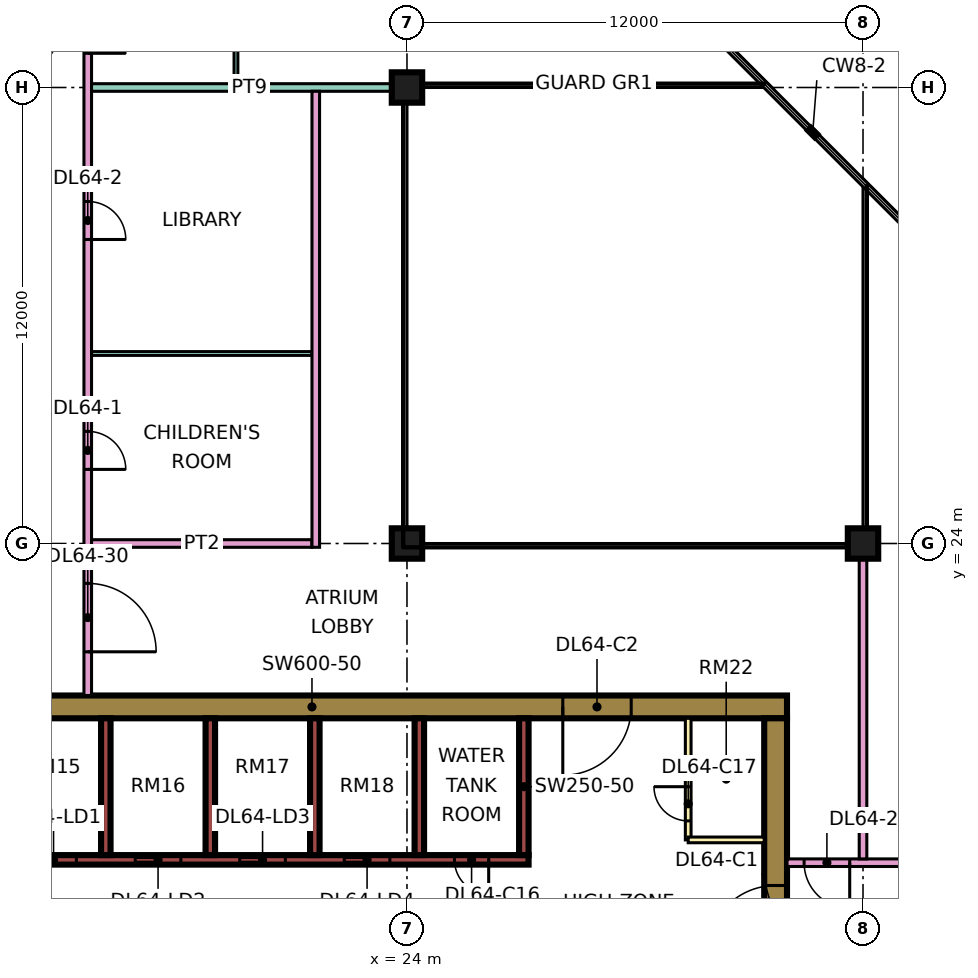
"""IFC4 building model, lengths in metres.
Left out: names, types, materials, properties, quantities, classifications, styles, units other than length and angle.
Written with IfcOpenShell. Run it as: python <this file> out.ifc"""

import sys

from ifc_helpers import new_model, si_unit, direction, frame, frame_2d, origin, origin_2d, place, context, subcontext, project, spatial, rectangle, extrude, element, fill, save


model = new_model("IFC4")
c1 = context("Model", 3, precision=1e-05, world=origin(), true_north=direction((0.0, 1.0)))
c2 = subcontext(c1, "Body", "Model", "MODEL_VIEW")
j1 = project(units=[si_unit("LENGTHUNIT", "METRE"), si_unit("PLANEANGLEUNIT", "RADIAN")], contexts=[c1])
p1 = place(None, origin())
s1 = spatial("IfcSite", under=j1, at=p1, CompositionType="ELEMENT")
p2 = place(p1, origin())
s2 = spatial("IfcBuilding", under=s1, at=p2, CompositionType="ELEMENT")
p3 = place(p2, frame((0.0, 0.0, 277.15)))
s3 = spatial("IfcBuildingStorey", under=s2, at=p3, CompositionType="ELEMENT", Elevation=277.15)
for number, where, z_axis, x_axis in (
    (1, (24.0, 24.0, 0.0), (0.0, 0.0, 1.0), (1.0, 0.0, 0.0)),
    (2, (24.0, 36.0, 0.0), (0.0, 0.0, 1.0), (1.0, 0.0, 0.0)),
    (3, (36.0, 24.0, 0.0), (0.0, 0.0, 1.0), (1.0, 0.0, 0.0)),
):
    element("IfcColumn", number, at=place(p3, frame(where, z_axis=z_axis, x_axis=x_axis)), inside=s3, PredefinedType="COLUMN", context=c2, shape_type="SweptSolid", body=[
        extrude(rectangle(XDim=0.8, YDim=0.8, at=origin_2d()), origin(), (0.0, 0.0, 1.0), 3.75),
    ])
p4 = place(p3, frame((9.0, 19.7, 0.0), z_axis=(0.0, 0.0, 1.0), x_axis=(1.0, 0.0, 0.0)))
e4 = element("IfcWall", 4, at=p4, inside=s3, PredefinedType="SHEAR", context=c2, shape_type="SweptSolid", body=[
    extrude(rectangle(XDim=25.0, YDim=0.6, at=frame_2d((12.5, 0.0))), origin(), (0.0, 0.0, 1.0), 3.75),
])
p5 = place(p4, frame((19.1, 0.0, 0.0)))
e5 = element("IfcOpeningElement", 5, at=p5, cuts=e4, PredefinedType="OPENING", context=c2, shape_type="SweptSolid", body=[
    extrude(rectangle(XDim=1.8, YDim=2.4, at=frame_2d((0.9, 1.2))), frame((0.0, 0.31, 0.0), z_axis=(0.0, -1.0, 0.0), x_axis=(1.0, 0.0, 0.0)), (0.0, 0.0, 1.0), 0.62),
])
p6 = place(p3, frame((33.7, 7.6, 0.0), z_axis=(0.0, 0.0, 1.0), x_axis=(0.0, 1.0, 0.0)))
e6 = element("IfcWall", 6, at=p6, inside=s3, PredefinedType="SHEAR", context=c2, shape_type="SweptSolid", body=[
    extrude(rectangle(XDim=11.8, YDim=0.6, at=frame_2d((5.9, 0.0))), origin(), (0.0, 0.0, 1.0), 3.75),
])
p7 = place(p6, frame((5.6, 0.0, 0.0)))
e7 = element("IfcOpeningElement", 7, at=p7, cuts=e6, PredefinedType="OPENING", context=c2, shape_type="SweptSolid", body=[
    extrude(rectangle(XDim=1.8, YDim=2.4, at=frame_2d((0.9, 1.2))), frame((0.0, 0.31, 0.0), z_axis=(0.0, -1.0, 0.0), x_axis=(1.0, 0.0, 0.0)), (0.0, 0.0, 1.0), 0.62),
])
p8 = place(p3, frame((13.45, 15.675, 0.0), z_axis=(0.0, 0.0, 1.0), x_axis=(1.0, 0.0, 0.0)))
e8 = element("IfcWall", 8, at=p8, inside=s3, PredefinedType="SHEAR", context=c2, shape_type="SweptSolid", body=[
    extrude(rectangle(XDim=13.75, YDim=0.25, at=frame_2d((6.875, 0.0))), origin(), (0.0, 0.0, 1.0), 3.75),
])
p9 = place(p8, frame((0.65, 0.0, 0.0)))
e9 = element("IfcOpeningElement", 9, at=p9, cuts=e8, PredefinedType="OPENING", context=c2, shape_type="SweptSolid", body=[
    extrude(rectangle(XDim=1.2, YDim=2.2, at=frame_2d((0.6, 1.1))), frame((0.0, 0.135, 0.0), z_axis=(0.0, -1.0, 0.0), x_axis=(1.0, 0.0, 0.0)), (0.0, 0.0, 1.0), 0.27),
])
p10 = place(p8, frame((3.4, 0.0, 0.0)))
e10 = element("IfcOpeningElement", 10, at=p10, cuts=e8, PredefinedType="OPENING", context=c2, shape_type="SweptSolid", body=[
    extrude(rectangle(XDim=1.2, YDim=2.2, at=frame_2d((0.6, 1.1))), frame((0.0, 0.135, 0.0), z_axis=(0.0, -1.0, 0.0), x_axis=(1.0, 0.0, 0.0)), (0.0, 0.0, 1.0), 0.27),
])
p11 = place(p8, frame((6.15, 0.0, 0.0)))
e11 = element("IfcOpeningElement", 11, at=p11, cuts=e8, PredefinedType="OPENING", context=c2, shape_type="SweptSolid", body=[
    extrude(rectangle(XDim=1.2, YDim=2.2, at=frame_2d((0.6, 1.1))), frame((0.0, 0.135, 0.0), z_axis=(0.0, -1.0, 0.0), x_axis=(1.0, 0.0, 0.0)), (0.0, 0.0, 1.0), 0.27),
])
p12 = place(p8, frame((8.9, 0.0, 0.0)))
e12 = element("IfcOpeningElement", 12, at=p12, cuts=e8, PredefinedType="OPENING", context=c2, shape_type="SweptSolid", body=[
    extrude(rectangle(XDim=1.2, YDim=2.2, at=frame_2d((0.6, 1.1))), frame((0.0, 0.135, 0.0), z_axis=(0.0, -1.0, 0.0), x_axis=(1.0, 0.0, 0.0)), (0.0, 0.0, 1.0), 0.27),
])
p13 = place(p8, frame((11.8, 0.0, 0.0)))
e13 = element("IfcOpeningElement", 13, at=p13, cuts=e8, PredefinedType="OPENING", context=c2, shape_type="SweptSolid", body=[
    extrude(rectangle(XDim=0.9, YDim=2.1, at=frame_2d((0.45, 1.05))), frame((0.0, 0.135, 0.0), z_axis=(0.0, -1.0, 0.0), x_axis=(1.0, 0.0, 0.0)), (0.0, 0.0, 1.0), 0.27),
])
for number, where, z_axis, x_axis in (
    (14, (16.075, 15.8, 0.0), (0.0, 0.0, 1.0), (0.0, 1.0, 0.0)),
    (15, (18.825, 15.8, 0.0), (0.0, 0.0, 1.0), (0.0, 1.0, 0.0)),
    (16, (21.575, 15.8, 0.0), (0.0, 0.0, 1.0), (0.0, 1.0, 0.0)),
    (17, (24.325, 15.8, 0.0), (0.0, 0.0, 1.0), (0.0, 1.0, 0.0)),
    (18, (27.075, 15.8, 0.0), (0.0, 0.0, 1.0), (0.0, 1.0, 0.0)),
):
    element("IfcWall", number, at=place(p3, frame(where, z_axis=z_axis, x_axis=x_axis)), inside=s3, PredefinedType="SHEAR", context=c2, shape_type="SweptSolid", body=[
        extrude(rectangle(XDim=3.6, YDim=0.25, at=frame_2d((1.8, 0.0))), origin(), (0.0, 0.0, 1.0), 3.75),
    ])
p14 = place(p3, frame((31.4, 16.2, 0.0), z_axis=(0.0, 0.0, 1.0), x_axis=(0.0, 1.0, 0.0)))
e19 = element("IfcWall", 19, at=p14, inside=s3, PredefinedType="PARTITIONING", context=c2, shape_type="SweptSolid", body=[
    extrude(rectangle(XDim=3.2, YDim=0.15, at=frame_2d((1.6, 0.0))), origin(), (0.0, 0.0, 1.0), 3.35),
])
p15 = place(p14, frame((0.5, 0.0, 0.0)))
e20 = element("IfcOpeningElement", 20, at=p15, cuts=e19, PredefinedType="OPENING", context=c2, shape_type="SweptSolid", body=[
    extrude(rectangle(XDim=0.9, YDim=2.1, at=frame_2d((0.45, 1.05))), frame((0.0, 0.085, 0.0), z_axis=(0.0, -1.0, 0.0), x_axis=(1.0, 0.0, 0.0)), (0.0, 0.0, 1.0), 0.17),
])
p16 = place(p3, frame((31.4, 16.2, 0.0), z_axis=(0.0, 0.0, 1.0), x_axis=(1.0, 0.0, 0.0)))
e21 = element("IfcWall", 21, at=p16, inside=s3, PredefinedType="PARTITIONING", context=c2, shape_type="SweptSolid", body=[
    extrude(rectangle(XDim=2.0, YDim=0.15, at=frame_2d((1.0, 0.0))), origin(), (0.0, 0.0, 1.0), 3.35),
])
p17 = place(p3, frame((15.6, 20.0, 0.0), z_axis=(0.0, 0.0, 1.0), x_axis=(0.0, 1.0, 0.0)))
e22 = element("IfcWall", 22, at=p17, inside=s3, PredefinedType="PARTITIONING", context=c2, shape_type="SweptSolid", body=[
    extrude(rectangle(XDim=27.775, YDim=0.2, at=frame_2d((13.887, 0.0))), origin(), (0.0, 0.0, 1.0), 3.35),
])
p18 = place(p17, frame((5.95, 0.0, 0.0)))
e23 = element("IfcOpeningElement", 23, at=p18, cuts=e22, PredefinedType="OPENING", context=c2, shape_type="SweptSolid", body=[
    extrude(rectangle(XDim=1.0, YDim=2.1, at=frame_2d((0.5, 1.05))), frame((0.0, 0.11, 0.0), z_axis=(0.0, -1.0, 0.0), x_axis=(1.0, 0.0, 0.0)), (0.0, 0.0, 1.0), 0.22),
])
p19 = place(p17, frame((12.0, 0.0, 0.0)))
e24 = element("IfcOpeningElement", 24, at=p19, cuts=e22, PredefinedType="OPENING", context=c2, shape_type="SweptSolid", body=[
    extrude(rectangle(XDim=1.0, YDim=2.1, at=frame_2d((0.5, 1.05))), frame((0.0, 0.11, 0.0), z_axis=(0.0, -1.0, 0.0), x_axis=(1.0, 0.0, 0.0)), (0.0, 0.0, 1.0), 0.22),
])
p20 = place(p17, frame((16.9, 0.0, 0.0)))
e25 = element("IfcOpeningElement", 25, at=p20, cuts=e22, PredefinedType="OPENING", context=c2, shape_type="SweptSolid", body=[
    extrude(rectangle(XDim=1.0, YDim=2.1, at=frame_2d((0.5, 1.05))), frame((0.0, 0.11, 0.0), z_axis=(0.0, -1.0, 0.0), x_axis=(1.0, 0.0, 0.0)), (0.0, 0.0, 1.0), 0.22),
])
p21 = place(p17, frame((1.15, 0.0, 0.0)))
e26 = element("IfcOpeningElement", 26, at=p21, cuts=e22, PredefinedType="OPENING", context=c2, shape_type="SweptSolid", body=[
    extrude(rectangle(XDim=1.8, YDim=2.1, at=frame_2d((0.9, 1.05))), frame((0.0, 0.11, 0.0), z_axis=(0.0, -1.0, 0.0), x_axis=(1.0, 0.0, 0.0)), (0.0, 0.0, 1.0), 0.22),
])
p22 = place(p17, frame((25.9, 0.0, 0.0)))
e27 = element("IfcOpeningElement", 27, at=p22, cuts=e22, PredefinedType="OPENING", context=c2, shape_type="SweptSolid", body=[
    extrude(rectangle(XDim=1.0, YDim=2.1, at=frame_2d((0.5, 1.05))), frame((0.0, 0.11, 0.0), z_axis=(0.0, -1.0, 0.0), x_axis=(1.0, 0.0, 0.0)), (0.0, 0.0, 1.0), 0.22),
])
p23 = place(p3, frame((15.7, 24.0, 0.0), z_axis=(0.0, 0.0, 1.0), x_axis=(1.0, 0.0, 0.0)))
e28 = element("IfcWall", 28, at=p23, inside=s3, PredefinedType="PARTITIONING", context=c2, shape_type="SweptSolid", body=[
    extrude(rectangle(XDim=5.8, YDim=0.2, at=frame_2d((2.9, 0.0))), origin(), (0.0, 0.0, 1.0), 3.35),
])
p24 = place(p3, frame((15.7, 29.0, 0.0), z_axis=(0.0, 0.0, 1.0), x_axis=(1.0, 0.0, 0.0)))
e29 = element("IfcWall", 29, at=p24, inside=s3, PredefinedType="PARTITIONING", context=c2, shape_type="SweptSolid", body=[
    extrude(rectangle(XDim=5.8, YDim=0.1, at=frame_2d((2.9, 0.0))), origin(), (0.0, 0.0, 1.0), 3.35),
])
p25 = place(p3, frame((15.7, 36.0, 0.0), z_axis=(0.0, 0.0, 1.0), x_axis=(1.0, 0.0, 0.0)))
e30 = element("IfcWall", 30, at=p25, inside=s3, PredefinedType="PARTITIONING", context=c2, shape_type="SweptSolid", body=[
    extrude(rectangle(XDim=8.3, YDim=0.2, at=frame_2d((4.15, 0.0))), origin(), (0.0, 0.0, 1.0), 3.35),
])
p26 = place(p3, frame((19.5, 36.1, 0.0), z_axis=(0.0, 0.0, 1.0), x_axis=(0.0, 1.0, 0.0)))
e31 = element("IfcWall", 31, at=p26, inside=s3, PredefinedType="PARTITIONING", context=c2, shape_type="SweptSolid", body=[
    extrude(rectangle(XDim=2.85, YDim=0.1, at=frame_2d((1.425, 0.0))), origin(), (0.0, 0.0, 1.0), 3.35),
])
p27 = place(p26, frame((0.95, 0.0, 0.0)))
e32 = element("IfcOpeningElement", 32, at=p27, cuts=e31, PredefinedType="OPENING", context=c2, shape_type="SweptSolid", body=[
    extrude(rectangle(XDim=0.9, YDim=2.1, at=frame_2d((0.45, 1.05))), frame((0.0, 0.06, 0.0), z_axis=(0.0, -1.0, 0.0), x_axis=(1.0, 0.0, 0.0)), (0.0, 0.0, 1.0), 0.12),
])
p28 = place(p3, frame((21.6, 23.9, 0.0), z_axis=(0.0, 0.0, 1.0), x_axis=(0.0, 1.0, 0.0)))
e33 = element("IfcWall", 33, at=p28, inside=s3, PredefinedType="PARTITIONING", context=c2, shape_type="SweptSolid", body=[
    extrude(rectangle(XDim=12.0, YDim=0.2, at=frame_2d((6.0, 0.0))), origin(), (0.0, 0.0, 1.0), 3.35),
])
p29 = place(p3, frame((34.0, 15.6, 0.0), z_axis=(0.0, 0.0, 1.0), x_axis=(1.0, 0.0, 0.0)))
e34 = element("IfcWall", 34, at=p29, inside=s3, PredefinedType="PARTITIONING", context=c2, shape_type="SweptSolid", body=[
    extrude(rectangle(XDim=10.35, YDim=0.2, at=frame_2d((5.175, 0.0))), origin(), (0.0, 0.0, 1.0), 3.35),
])
p30 = place(p29, frame((5.6, 0.0, 0.0)))
e35 = element("IfcOpeningElement", 35, at=p30, cuts=e34, PredefinedType="OPENING", context=c2, shape_type="SweptSolid", body=[
    extrude(rectangle(XDim=1.0, YDim=2.1, at=frame_2d((0.5, 1.05))), frame((0.0, 0.11, 0.0), z_axis=(0.0, -1.0, 0.0), x_axis=(1.0, 0.0, 0.0)), (0.0, 0.0, 1.0), 0.22),
])
p31 = place(p29, frame((0.45, 0.0, 0.0)))
e36 = element("IfcOpeningElement", 36, at=p31, cuts=e34, PredefinedType="OPENING", context=c2, shape_type="SweptSolid", body=[
    extrude(rectangle(XDim=1.2, YDim=2.1, at=frame_2d((0.6, 1.05))), frame((0.0, 0.11, 0.0), z_axis=(0.0, -1.0, 0.0), x_axis=(1.0, 0.0, 0.0)), (0.0, 0.0, 1.0), 0.22),
])
p32 = place(p3, frame((36.0, 15.7, 0.0), z_axis=(0.0, 0.0, 1.0), x_axis=(0.0, 1.0, 0.0)))
e37 = element("IfcWall", 37, at=p32, inside=s3, PredefinedType="PARTITIONING", context=c2, shape_type="SweptSolid", body=[
    extrude(rectangle(XDim=8.3, YDim=0.2, at=frame_2d((4.15, 0.0))), origin(), (0.0, 0.0, 1.0), 3.35),
])
p33 = place(p9, origin())
e38 = element("IfcDoor", 38, at=p33, inside=s3, OperationType="DOUBLE_DOOR_SLIDING", PredefinedType="DOOR", context=c2, shape_type="SweptSolid", body=[
    extrude(rectangle(XDim=1.2, YDim=2.2, at=frame_2d((0.6, 1.1))), frame((0.0, 0.025, 0.0), z_axis=(0.0, -1.0, 0.0), x_axis=(1.0, 0.0, 0.0)), (0.0, 0.0, 1.0), 0.05),
])
fill(e9, e38)
p34 = place(p10, origin())
e39 = element("IfcDoor", 39, at=p34, inside=s3, OperationType="DOUBLE_DOOR_SLIDING", PredefinedType="DOOR", context=c2, shape_type="SweptSolid", body=[
    extrude(rectangle(XDim=1.2, YDim=2.2, at=frame_2d((0.6, 1.1))), frame((0.0, 0.025, 0.0), z_axis=(0.0, -1.0, 0.0), x_axis=(1.0, 0.0, 0.0)), (0.0, 0.0, 1.0), 0.05),
])
fill(e10, e39)
p35 = place(p11, origin())
e40 = element("IfcDoor", 40, at=p35, inside=s3, OperationType="DOUBLE_DOOR_SLIDING", PredefinedType="DOOR", context=c2, shape_type="SweptSolid", body=[
    extrude(rectangle(XDim=1.2, YDim=2.2, at=frame_2d((0.6, 1.1))), frame((0.0, 0.025, 0.0), z_axis=(0.0, -1.0, 0.0), x_axis=(1.0, 0.0, 0.0)), (0.0, 0.0, 1.0), 0.05),
])
fill(e11, e40)
p36 = place(p12, origin())
e41 = element("IfcDoor", 41, at=p36, inside=s3, OperationType="DOUBLE_DOOR_SLIDING", PredefinedType="DOOR", context=c2, shape_type="SweptSolid", body=[
    extrude(rectangle(XDim=1.2, YDim=2.2, at=frame_2d((0.6, 1.1))), frame((0.0, 0.025, 0.0), z_axis=(0.0, -1.0, 0.0), x_axis=(1.0, 0.0, 0.0)), (0.0, 0.0, 1.0), 0.05),
])
fill(e12, e41)
p37 = place(p7, origin())
e42 = element("IfcDoor", 42, at=p37, inside=s3, OperationType="DOUBLE_DOOR_SINGLE_SWING", PredefinedType="DOOR", context=c2, shape_type="SweptSolid", body=[
    extrude(rectangle(XDim=1.8, YDim=2.4, at=frame_2d((0.9, 1.2))), frame((0.0, 0.025, 0.0), z_axis=(0.0, -1.0, 0.0), x_axis=(1.0, 0.0, 0.0)), (0.0, 0.0, 1.0), 0.05),
])
fill(e7, e42)
p38 = place(p5, frame((1.8, 0.0, 0.0), z_axis=(0.0, 0.0, 1.0), x_axis=(-1.0, 0.0, 0.0)))
e43 = element("IfcDoor", 43, at=p38, inside=s3, OperationType="DOUBLE_DOOR_SINGLE_SWING", PredefinedType="DOOR", context=c2, shape_type="SweptSolid", body=[
    extrude(rectangle(XDim=1.8, YDim=2.4, at=frame_2d((0.9, 1.2))), frame((0.0, 0.025, 0.0), z_axis=(0.0, -1.0, 0.0), x_axis=(1.0, 0.0, 0.0)), (0.0, 0.0, 1.0), 0.05),
])
fill(e5, e43)
p39 = place(p13, origin())
e44 = element("IfcDoor", 44, at=p39, inside=s3, OperationType="SINGLE_SWING_RIGHT", PredefinedType="DOOR", context=c2, shape_type="SweptSolid", body=[
    extrude(rectangle(XDim=0.9, YDim=2.1, at=frame_2d((0.45, 1.05))), frame((0.0, 0.025, 0.0), z_axis=(0.0, -1.0, 0.0), x_axis=(1.0, 0.0, 0.0)), (0.0, 0.0, 1.0), 0.05),
])
fill(e13, e44)
p40 = place(p15, frame((0.9, 0.0, 0.0), z_axis=(0.0, 0.0, 1.0), x_axis=(-1.0, 0.0, 0.0)))
e45 = element("IfcDoor", 45, at=p40, inside=s3, OperationType="SINGLE_SWING_RIGHT", PredefinedType="DOOR", context=c2, shape_type="SweptSolid", body=[
    extrude(rectangle(XDim=0.9, YDim=2.1, at=frame_2d((0.45, 1.05))), frame((0.0, 0.025, 0.0), z_axis=(0.0, -1.0, 0.0), x_axis=(1.0, 0.0, 0.0)), (0.0, 0.0, 1.0), 0.05),
])
fill(e20, e45)
p41 = place(p18, frame((1.0, 0.0, 0.0), z_axis=(0.0, 0.0, 1.0), x_axis=(-1.0, 0.0, 0.0)))
e46 = element("IfcDoor", 46, at=p41, inside=s3, OperationType="SINGLE_SWING_LEFT", PredefinedType="DOOR", context=c2, shape_type="SweptSolid", body=[
    extrude(rectangle(XDim=1.0, YDim=2.1, at=frame_2d((0.5, 1.05))), frame((0.0, 0.025, 0.0), z_axis=(0.0, -1.0, 0.0), x_axis=(1.0, 0.0, 0.0)), (0.0, 0.0, 1.0), 0.05),
])
fill(e23, e46)
p42 = place(p19, frame((1.0, 0.0, 0.0), z_axis=(0.0, 0.0, 1.0), x_axis=(-1.0, 0.0, 0.0)))
e47 = element("IfcDoor", 47, at=p42, inside=s3, OperationType="SINGLE_SWING_LEFT", PredefinedType="DOOR", context=c2, shape_type="SweptSolid", body=[
    extrude(rectangle(XDim=1.0, YDim=2.1, at=frame_2d((0.5, 1.05))), frame((0.0, 0.025, 0.0), z_axis=(0.0, -1.0, 0.0), x_axis=(1.0, 0.0, 0.0)), (0.0, 0.0, 1.0), 0.05),
])
fill(e24, e47)
p43 = place(p20, frame((1.0, 0.0, 0.0), z_axis=(0.0, 0.0, 1.0), x_axis=(-1.0, 0.0, 0.0)))
e48 = element("IfcDoor", 48, at=p43, inside=s3, OperationType="SINGLE_SWING_LEFT", PredefinedType="DOOR", context=c2, shape_type="SweptSolid", body=[
    extrude(rectangle(XDim=1.0, YDim=2.1, at=frame_2d((0.5, 1.05))), frame((0.0, 0.025, 0.0), z_axis=(0.0, -1.0, 0.0), x_axis=(1.0, 0.0, 0.0)), (0.0, 0.0, 1.0), 0.05),
])
fill(e25, e48)
p44 = place(p31, origin())
e49 = element("IfcDoor", 49, at=p44, inside=s3, OperationType="SINGLE_SWING_RIGHT", PredefinedType="DOOR", context=c2, shape_type="SweptSolid", body=[
    extrude(rectangle(XDim=1.2, YDim=2.1, at=frame_2d((0.6, 1.05))), frame((0.0, 0.025, 0.0), z_axis=(0.0, -1.0, 0.0), x_axis=(1.0, 0.0, 0.0)), (0.0, 0.0, 1.0), 0.05),
])
fill(e36, e49)
p45 = place(p21, frame((1.8, 0.0, 0.0), z_axis=(0.0, 0.0, 1.0), x_axis=(-1.0, 0.0, 0.0)))
e50 = element("IfcDoor", 50, at=p45, inside=s3, OperationType="DOUBLE_DOOR_SINGLE_SWING", PredefinedType="DOOR", context=c2, shape_type="SweptSolid", body=[
    extrude(rectangle(XDim=1.8, YDim=2.1, at=frame_2d((0.9, 1.05))), frame((0.0, 0.025, 0.0), z_axis=(0.0, -1.0, 0.0), x_axis=(1.0, 0.0, 0.0)), (0.0, 0.0, 1.0), 0.05),
])
fill(e26, e50)
save(model, sys.argv[1])
